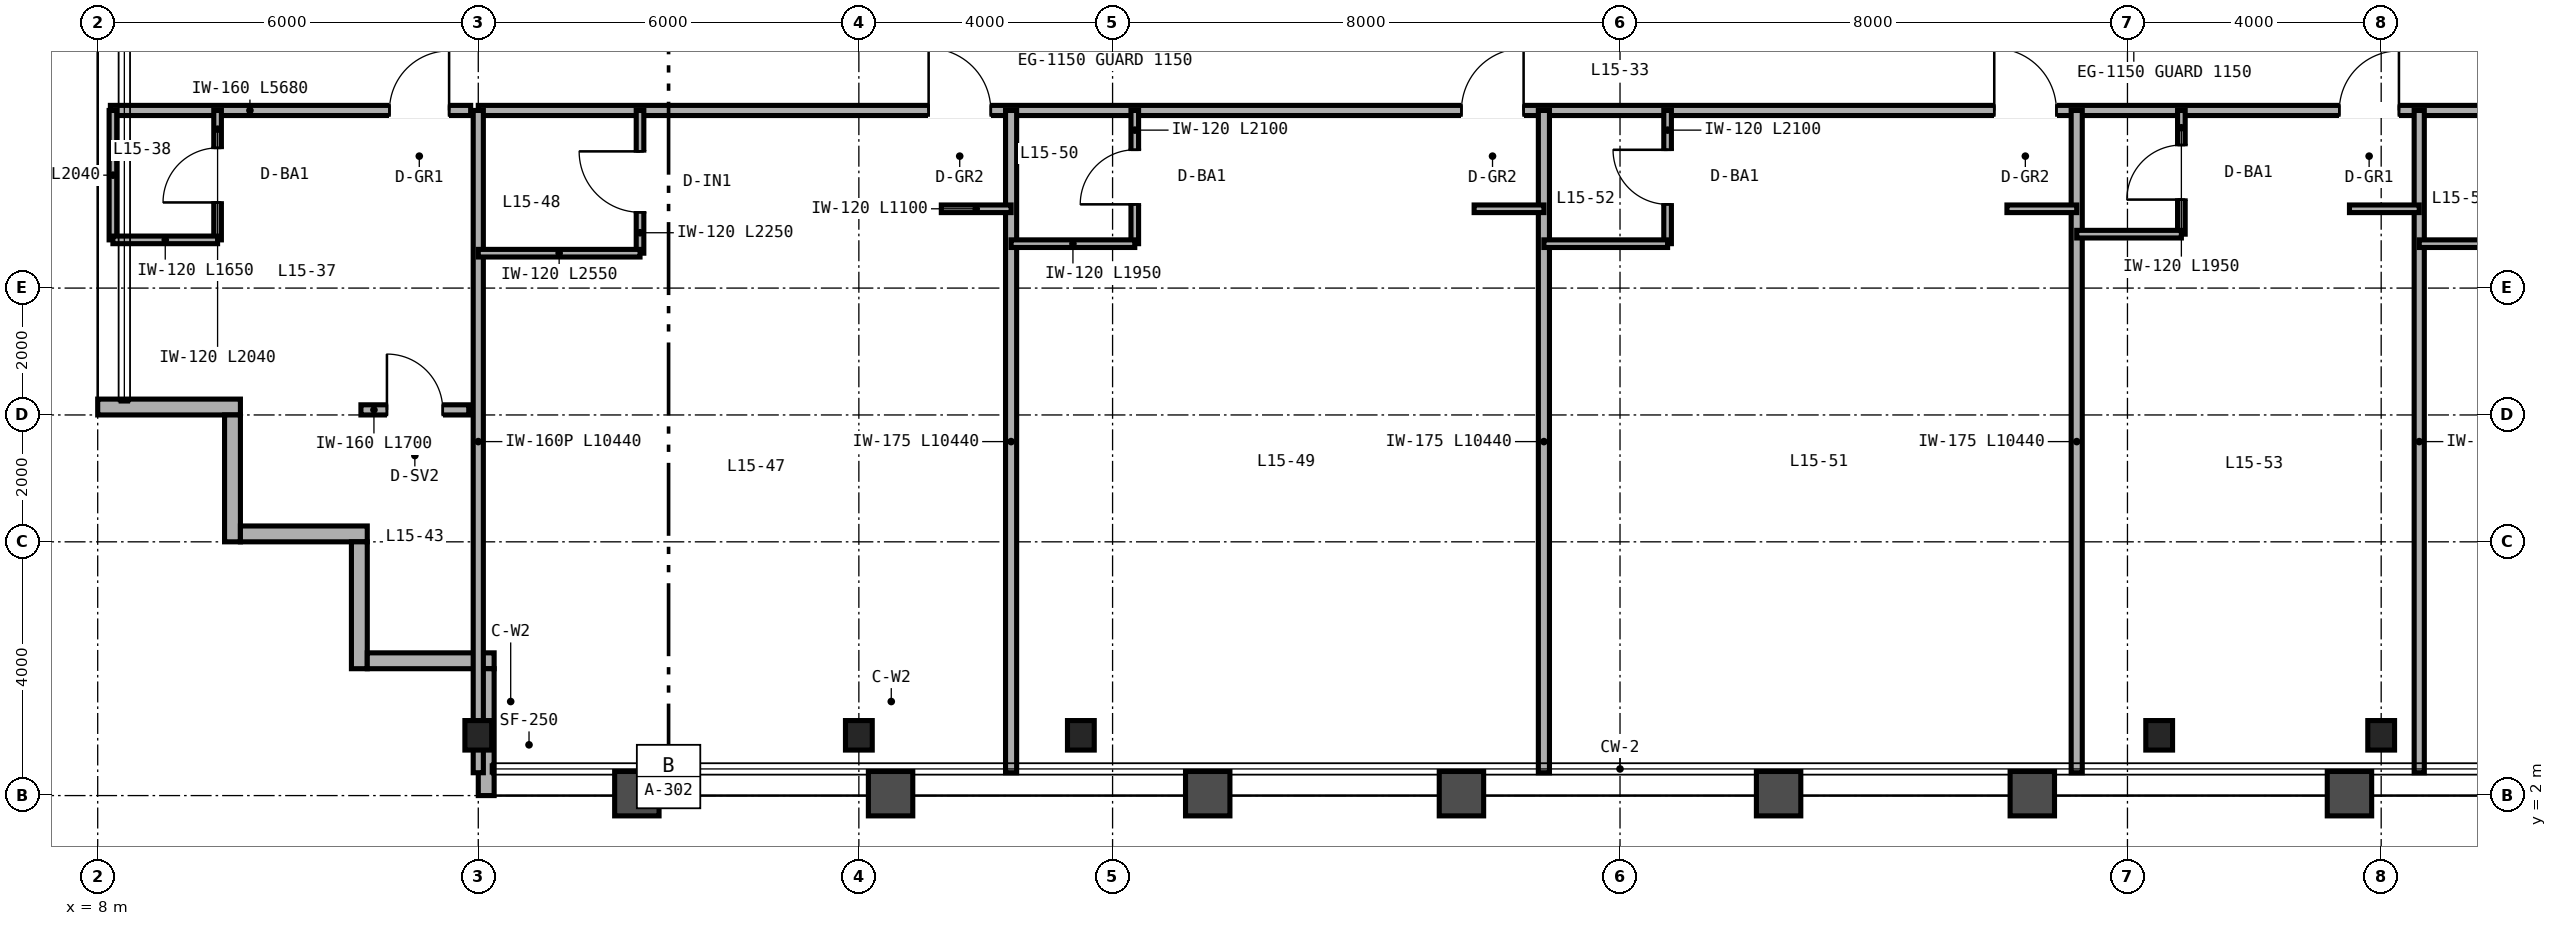
"""IFC4 building model, lengths in metres.
Left out: names, types, materials, properties, quantities, classifications, styles, units other than length and angle.
Written with IfcOpenShell. Run it as: python <this file> out.ifc"""

import sys

from ifc_helpers import new_model, si_unit, direction, frame, frame_2d, origin, origin_2d, place, context, subcontext, project, spatial, rectangle, i_section, extrude, source, transform, mapped, element, fill, save


model = new_model("IFC4")
c1 = context("Model", 3, precision=1e-05, world=origin(), true_north=direction((0.0, 1.0)))
c2 = subcontext(c1, "Body", "Model", "MODEL_VIEW")
j1 = project(units=[si_unit("LENGTHUNIT", "METRE"), si_unit("PLANEANGLEUNIT", "RADIAN")], contexts=[c1])
p1 = place(None, origin())
s1 = spatial("IfcSite", under=j1, at=p1, CompositionType="ELEMENT")
p2 = place(p1, origin())
s2 = spatial("IfcBuilding", under=s1, at=p2, CompositionType="ELEMENT")
p3 = place(p2, frame((0.0, 0.0, 63.6)))
s3 = spatial("IfcBuildingStorey", under=s2, at=p3, CompositionType="ELEMENT", Elevation=63.6)
m1 = source(origin(), c2, "Body", "SweptSolid", [
    extrude(i_section(OverallWidth=0.422, OverallDepth=0.465, WebThickness=0.045, FlangeThickness=0.073, FilletRadius=0.025, at=origin_2d()), origin(), (0.0, 0.0, 1.0), 3.35),
])
for number, where, z_axis, x_axis in (
    (1, (14.0, 2.95, 0.0), (0.0, 0.0, 1.0), (1.0, 0.0, 0.0)),
    (2, (20.0, 2.95, 0.0), (0.0, 0.0, 1.0), (1.0, 0.0, 0.0)),
    (3, (23.5, 2.95, 0.0), (0.0, 0.0, 1.0), (1.0, 0.0, 0.0)),
    (4, (40.5, 2.95, 0.0), (0.0, 0.0, 1.0), (1.0, 0.0, 0.0)),
    (5, (44.0, 2.95, 0.0), (0.0, 0.0, 1.0), (1.0, 0.0, 0.0)),
):
    element("IfcColumn", number, at=place(p3, frame(where, z_axis=z_axis, x_axis=x_axis)), inside=s3, PredefinedType="COLUMN", context=c2, shape_type="MappedRepresentation", body=[
        mapped(m1, transform((0.0, 0.0, 0.0), scale=1.0)),
    ])
p4 = place(p3, frame((8.0, 8.125, 0.0), z_axis=(0.0, 0.0, 1.0), x_axis=(1.0, 0.0, 0.0)))
e6 = element("IfcWall", 6, at=p4, inside=s3, PredefinedType="SOLIDWALL", context=c2, shape_type="SweptSolid", body=[
    extrude(rectangle(XDim=2.25, YDim=0.25, at=frame_2d((1.125, 0.0))), origin(), (0.0, 0.0, 1.0), 3.35),
])
for number, where, z_axis, x_axis in (
    (7, (10.125, 8.0, 0.0), (0.0, 0.0, 1.0), (0.0, -1.0, 0.0)),
    (8, (10.25, 6.125, 0.0), (0.0, 0.0, 1.0), (1.0, 0.0, 0.0)),
    (9, (12.125, 6.0, 0.0), (0.0, 0.0, 1.0), (0.0, -1.0, 0.0)),
    (10, (12.25, 4.125, 0.0), (0.0, 0.0, 1.0), (1.0, 0.0, 0.0)),
):
    element("IfcWall", number, at=place(p3, frame(where, z_axis=z_axis, x_axis=x_axis)), inside=s3, PredefinedType="SOLIDWALL", context=c2, shape_type="SweptSolid", body=[
        extrude(rectangle(XDim=2.0, YDim=0.25, at=frame_2d((1.0, 0.0))), origin(), (0.0, 0.0, 1.0), 3.35),
    ])
p5 = place(p3, frame((14.125, 4.0, 0.0), z_axis=(0.0, 0.0, 1.0), x_axis=(0.0, -1.0, 0.0)))
e11 = element("IfcWall", 11, at=p5, inside=s3, PredefinedType="SOLIDWALL", context=c2, shape_type="SweptSolid", body=[
    extrude(rectangle(XDim=2.0, YDim=0.25, at=frame_2d((1.0, 0.0))), origin(), (0.0, 0.0, 1.0), 2.657),
])
p6 = place(p3, frame((8.2, 12.8, 0.0), z_axis=(0.0, 0.0, 1.0), x_axis=(1.0, 0.0, 0.0)))
e12 = element("IfcWall", 12, at=p6, inside=s3, PredefinedType="PARTITIONING", context=c2, shape_type="SweptSolid", body=[
    extrude(rectangle(XDim=5.68, YDim=0.16, at=frame_2d((2.84, 0.0))), origin(), (0.0, 0.0, 1.0), 3.35),
])
p7 = place(p6, frame((4.4, 0.0, 0.0)))
e13 = element("IfcOpeningElement", 13, at=p7, cuts=e12, PredefinedType="OPENING", context=c2, shape_type="SweptSolid", body=[
    extrude(rectangle(XDim=0.94, YDim=2.15, at=frame_2d((0.47, 1.075))), frame((0.0, 0.09, 0.0), z_axis=(0.0, -1.0, 0.0), x_axis=(1.0, 0.0, 0.0)), (0.0, 0.0, 1.0), 0.18),
])
p8 = place(p3, frame((9.89, 10.76, 0.0), z_axis=(0.0, 0.0, 1.0), x_axis=(0.0, 1.0, 0.0)))
e14 = element("IfcWall", 14, at=p8, inside=s3, PredefinedType="PARTITIONING", context=c2, shape_type="SweptSolid", body=[
    extrude(rectangle(XDim=2.04, YDim=0.12, at=frame_2d((1.02, 0.0))), origin(), (0.0, 0.0, 1.0), 3.35),
])
p9 = place(p8, frame((0.59, 0.0, 0.0)))
e15 = element("IfcOpeningElement", 15, at=p9, cuts=e14, PredefinedType="OPENING", context=c2, shape_type="SweptSolid", body=[
    extrude(rectangle(XDim=0.86, YDim=2.1, at=frame_2d((0.43, 1.05))), frame((0.0, 0.07, 0.0), z_axis=(0.0, -1.0, 0.0), x_axis=(1.0, 0.0, 0.0)), (0.0, 0.0, 1.0), 0.14),
])
p10 = place(p3, frame((8.24, 10.76, 0.0), z_axis=(0.0, 0.0, 1.0), x_axis=(0.0, 1.0, 0.0)))
e16 = element("IfcWall", 16, at=p10, inside=s3, PredefinedType="PARTITIONING", context=c2, shape_type="SweptSolid", body=[
    extrude(rectangle(XDim=2.04, YDim=0.12, at=frame_2d((1.02, 0.0))), origin(), (0.0, 0.0, 1.0), 3.35),
])
p11 = place(p3, frame((8.24, 10.76, 0.0), z_axis=(0.0, 0.0, 1.0), x_axis=(1.0, 0.0, 0.0)))
e17 = element("IfcWall", 17, at=p11, inside=s3, PredefinedType="PARTITIONING", context=c2, shape_type="SweptSolid", body=[
    extrude(rectangle(XDim=1.65, YDim=0.12, at=frame_2d((0.825, 0.0))), origin(), (0.0, 0.0, 1.0), 3.35),
])
p12 = place(p3, frame((12.15, 8.08, 0.0), z_axis=(0.0, 0.0, 1.0), x_axis=(1.0, 0.0, 0.0)))
e18 = element("IfcWall", 18, at=p12, inside=s3, PredefinedType="PARTITIONING", context=c2, shape_type="SweptSolid", body=[
    extrude(rectangle(XDim=1.7, YDim=0.16, at=frame_2d((0.85, 0.0))), origin(), (0.0, 0.0, 1.0), 3.35),
])
p13 = place(p12, frame((0.41, 0.0, 0.0)))
e19 = element("IfcOpeningElement", 19, at=p13, cuts=e18, PredefinedType="OPENING", context=c2, shape_type="SweptSolid", body=[
    extrude(rectangle(XDim=0.88, YDim=2.15, at=frame_2d((0.44, 1.075))), frame((0.0, 0.09, 0.0), z_axis=(0.0, -1.0, 0.0), x_axis=(1.0, 0.0, 0.0)), (0.0, 0.0, 1.0), 0.18),
])
p14 = place(p3, frame((14.0, 12.8, 0.0), z_axis=(0.0, 0.0, 1.0), x_axis=(1.0, 0.0, 0.0)))
e20 = element("IfcWall", 20, at=p14, inside=s3, PredefinedType="PARTITIONING", context=c2, shape_type="SweptSolid", body=[
    extrude(rectangle(XDim=36.0, YDim=0.16, at=frame_2d((18.0, 0.0))), origin(), (0.0, 0.0, 1.0), 2.571),
])
p15 = place(p14, frame((7.1, 0.0, 0.0)))
e21 = element("IfcOpeningElement", 21, at=p15, cuts=e20, PredefinedType="OPENING", context=c2, shape_type="SweptSolid", body=[
    extrude(rectangle(XDim=0.98, YDim=2.2, at=frame_2d((0.49, 1.1))), frame((0.0, 0.09, 0.0), z_axis=(0.0, -1.0, 0.0), x_axis=(1.0, 0.0, 0.0)), (0.0, 0.0, 1.0), 0.18),
])
p16 = place(p14, frame((15.5, 0.0, 0.0)))
e22 = element("IfcOpeningElement", 22, at=p16, cuts=e20, PredefinedType="OPENING", context=c2, shape_type="SweptSolid", body=[
    extrude(rectangle(XDim=0.98, YDim=2.2, at=frame_2d((0.49, 1.1))), frame((0.0, 0.09, 0.0), z_axis=(0.0, -1.0, 0.0), x_axis=(1.0, 0.0, 0.0)), (0.0, 0.0, 1.0), 0.18),
])
p17 = place(p14, frame((23.9, 0.0, 0.0)))
e23 = element("IfcOpeningElement", 23, at=p17, cuts=e20, PredefinedType="OPENING", context=c2, shape_type="SweptSolid", body=[
    extrude(rectangle(XDim=0.98, YDim=2.2, at=frame_2d((0.49, 1.1))), frame((0.0, 0.09, 0.0), z_axis=(0.0, -1.0, 0.0), x_axis=(1.0, 0.0, 0.0)), (0.0, 0.0, 1.0), 0.18),
])
p18 = place(p14, frame((29.34, 0.0, 0.0)))
e24 = element("IfcOpeningElement", 24, at=p18, cuts=e20, PredefinedType="OPENING", context=c2, shape_type="SweptSolid", body=[
    extrude(rectangle(XDim=0.94, YDim=2.15, at=frame_2d((0.47, 1.075))), frame((0.0, 0.09, 0.0), z_axis=(0.0, -1.0, 0.0), x_axis=(1.0, 0.0, 0.0)), (0.0, 0.0, 1.0), 0.18),
])
p19 = place(p14, frame((34.74, 0.0, 0.0)))
e25 = element("IfcOpeningElement", 25, at=p19, cuts=e20, PredefinedType="OPENING", context=c2, shape_type="SweptSolid", body=[
    extrude(rectangle(XDim=0.94, YDim=2.15, at=frame_2d((0.47, 1.075))), frame((0.0, 0.09, 0.0), z_axis=(0.0, -1.0, 0.0), x_axis=(1.0, 0.0, 0.0)), (0.0, 0.0, 1.0), 0.18),
])
p20 = place(p3, frame((14.0, 2.36, 0.0), z_axis=(0.0, 0.0, 1.0), x_axis=(0.0, 1.0, 0.0)))
e26 = element("IfcWall", 26, at=p20, inside=s3, PredefinedType="PARTITIONING", context=c2, shape_type="SweptSolid", body=[
    extrude(rectangle(XDim=10.44, YDim=0.16, at=frame_2d((5.22, 0.0))), origin(), (0.0, 0.0, 1.0), 2.657),
])
p21 = place(p3, frame((22.4, 2.36, 0.0), z_axis=(0.0, 0.0, 1.0), x_axis=(0.0, 1.0, 0.0)))
e27 = element("IfcWall", 27, at=p21, inside=s3, PredefinedType="PARTITIONING", context=c2, shape_type="SweptSolid", body=[
    extrude(rectangle(XDim=10.44, YDim=0.175, at=frame_2d((5.22, 0.0))), origin(), (0.0, 0.0, 1.0), 2.813),
])
p22 = place(p3, frame((16.55, 10.55, 0.0), z_axis=(0.0, 0.0, 1.0), x_axis=(0.0, 1.0, 0.0)))
e28 = element("IfcWall", 28, at=p22, inside=s3, PredefinedType="PARTITIONING", context=c2, shape_type="SweptSolid", body=[
    extrude(rectangle(XDim=2.25, YDim=0.12, at=frame_2d((1.125, 0.0))), origin(), (0.0, 0.0, 1.0), 3.35),
])
p23 = place(p22, frame((0.645, 0.0, 0.0)))
e29 = element("IfcOpeningElement", 29, at=p23, cuts=e28, PredefinedType="OPENING", context=c2, shape_type="SweptSolid", body=[
    extrude(rectangle(XDim=0.96, YDim=2.15, at=frame_2d((0.48, 1.075))), frame((0.0, 0.07, 0.0), z_axis=(0.0, -1.0, 0.0), x_axis=(1.0, 0.0, 0.0)), (0.0, 0.0, 1.0), 0.14),
])
p24 = place(p3, frame((14.0, 10.55, 0.0), z_axis=(0.0, 0.0, 1.0), x_axis=(1.0, 0.0, 0.0)))
e30 = element("IfcWall", 30, at=p24, inside=s3, PredefinedType="PARTITIONING", context=c2, shape_type="SweptSolid", body=[
    extrude(rectangle(XDim=2.55, YDim=0.12, at=frame_2d((1.275, 0.0))), origin(), (0.0, 0.0, 1.0), 3.35),
])
p25 = place(p3, frame((21.3, 11.25, 0.0), z_axis=(0.0, 0.0, 1.0), x_axis=(1.0, 0.0, 0.0)))
e31 = element("IfcWall", 31, at=p25, inside=s3, PredefinedType="PARTITIONING", context=c2, shape_type="SweptSolid", body=[
    extrude(rectangle(XDim=1.1, YDim=0.12, at=frame_2d((0.55, 0.0))), origin(), (0.0, 0.0, 1.0), 3.35),
])
p26 = place(p3, frame((30.8, 2.36, 0.0), z_axis=(0.0, 0.0, 1.0), x_axis=(0.0, 1.0, 0.0)))
e32 = element("IfcWall", 32, at=p26, inside=s3, PredefinedType="PARTITIONING", context=c2, shape_type="SweptSolid", body=[
    extrude(rectangle(XDim=10.44, YDim=0.175, at=frame_2d((5.22, 0.0))), origin(), (0.0, 0.0, 1.0), 2.423),
])
p27 = place(p3, frame((24.35, 10.7, 0.0), z_axis=(0.0, 0.0, 1.0), x_axis=(0.0, 1.0, 0.0)))
e33 = element("IfcWall", 33, at=p27, inside=s3, PredefinedType="PARTITIONING", context=c2, shape_type="SweptSolid", body=[
    extrude(rectangle(XDim=2.1, YDim=0.12, at=frame_2d((1.05, 0.0))), origin(), (0.0, 0.0, 1.0), 3.35),
])
p28 = place(p27, frame((0.62, 0.0, 0.0)))
e34 = element("IfcOpeningElement", 34, at=p28, cuts=e33, PredefinedType="OPENING", context=c2, shape_type="SweptSolid", body=[
    extrude(rectangle(XDim=0.86, YDim=2.1, at=frame_2d((0.43, 1.05))), frame((0.0, 0.07, 0.0), z_axis=(0.0, -1.0, 0.0), x_axis=(1.0, 0.0, 0.0)), (0.0, 0.0, 1.0), 0.14),
])
p29 = place(p3, frame((22.4, 10.7, 0.0), z_axis=(0.0, 0.0, 1.0), x_axis=(1.0, 0.0, 0.0)))
e35 = element("IfcWall", 35, at=p29, inside=s3, PredefinedType="PARTITIONING", context=c2, shape_type="SweptSolid", body=[
    extrude(rectangle(XDim=1.95, YDim=0.12, at=frame_2d((0.975, 0.0))), origin(), (0.0, 0.0, 1.0), 2.571),
])
p30 = place(p3, frame((29.7, 11.25, 0.0), z_axis=(0.0, 0.0, 1.0), x_axis=(1.0, 0.0, 0.0)))
e36 = element("IfcWall", 36, at=p30, inside=s3, PredefinedType="PARTITIONING", context=c2, shape_type="SweptSolid", body=[
    extrude(rectangle(XDim=1.1, YDim=0.12, at=frame_2d((0.55, 0.0))), origin(), (0.0, 0.0, 1.0), 3.35),
])
p31 = place(p3, frame((39.2, 2.36, 0.0), z_axis=(0.0, 0.0, 1.0), x_axis=(0.0, 1.0, 0.0)))
e37 = element("IfcWall", 37, at=p31, inside=s3, PredefinedType="PARTITIONING", context=c2, shape_type="SweptSolid", body=[
    extrude(rectangle(XDim=10.44, YDim=0.175, at=frame_2d((5.22, 0.0))), origin(), (0.0, 0.0, 1.0), 2.423),
])
p32 = place(p3, frame((32.75, 10.7, 0.0), z_axis=(0.0, 0.0, 1.0), x_axis=(0.0, 1.0, 0.0)))
e38 = element("IfcWall", 38, at=p32, inside=s3, PredefinedType="PARTITIONING", context=c2, shape_type="SweptSolid", body=[
    extrude(rectangle(XDim=2.1, YDim=0.12, at=frame_2d((1.05, 0.0))), origin(), (0.0, 0.0, 1.0), 3.35),
])
p33 = place(p32, frame((0.62, 0.0, 0.0)))
e39 = element("IfcOpeningElement", 39, at=p33, cuts=e38, PredefinedType="OPENING", context=c2, shape_type="SweptSolid", body=[
    extrude(rectangle(XDim=0.86, YDim=2.1, at=frame_2d((0.43, 1.05))), frame((0.0, 0.07, 0.0), z_axis=(0.0, -1.0, 0.0), x_axis=(1.0, 0.0, 0.0)), (0.0, 0.0, 1.0), 0.14),
])
p34 = place(p3, frame((30.8, 10.7, 0.0), z_axis=(0.0, 0.0, 1.0), x_axis=(1.0, 0.0, 0.0)))
e40 = element("IfcWall", 40, at=p34, inside=s3, PredefinedType="PARTITIONING", context=c2, shape_type="SweptSolid", body=[
    extrude(rectangle(XDim=1.95, YDim=0.12, at=frame_2d((0.975, 0.0))), origin(), (0.0, 0.0, 1.0), 3.35),
])
p35 = place(p3, frame((38.1, 11.25, 0.0), z_axis=(0.0, 0.0, 1.0), x_axis=(1.0, 0.0, 0.0)))
e41 = element("IfcWall", 41, at=p35, inside=s3, PredefinedType="PARTITIONING", context=c2, shape_type="SweptSolid", body=[
    extrude(rectangle(XDim=1.1, YDim=0.12, at=frame_2d((0.55, 0.0))), origin(), (0.0, 0.0, 1.0), 3.35),
])
p36 = place(p3, frame((44.6, 2.36, 0.0), z_axis=(0.0, 0.0, 1.0), x_axis=(0.0, 1.0, 0.0)))
e42 = element("IfcWall", 42, at=p36, inside=s3, PredefinedType="PARTITIONING", context=c2, shape_type="SweptSolid", body=[
    extrude(rectangle(XDim=10.44, YDim=0.16, at=frame_2d((5.22, 0.0))), origin(), (0.0, 0.0, 1.0), 2.657),
])
p37 = place(p3, frame((40.85, 10.85, 0.0), z_axis=(0.0, 0.0, 1.0), x_axis=(0.0, 1.0, 0.0)))
e43 = element("IfcWall", 43, at=p37, inside=s3, PredefinedType="PARTITIONING", context=c2, shape_type="SweptSolid", body=[
    extrude(rectangle(XDim=1.95, YDim=0.12, at=frame_2d((0.975, 0.0))), origin(), (0.0, 0.0, 1.0), 3.35),
])
p38 = place(p37, frame((0.545, 0.0, 0.0)))
e44 = element("IfcOpeningElement", 44, at=p38, cuts=e43, PredefinedType="OPENING", context=c2, shape_type="SweptSolid", body=[
    extrude(rectangle(XDim=0.86, YDim=2.1, at=frame_2d((0.43, 1.05))), frame((0.0, 0.07, 0.0), z_axis=(0.0, -1.0, 0.0), x_axis=(1.0, 0.0, 0.0)), (0.0, 0.0, 1.0), 0.14),
])
p39 = place(p3, frame((39.2, 10.85, 0.0), z_axis=(0.0, 0.0, 1.0), x_axis=(1.0, 0.0, 0.0)))
e45 = element("IfcWall", 45, at=p39, inside=s3, PredefinedType="PARTITIONING", context=c2, shape_type="SweptSolid", body=[
    extrude(rectangle(XDim=1.65, YDim=0.12, at=frame_2d((0.825, 0.0))), origin(), (0.0, 0.0, 1.0), 2.571),
])
p40 = place(p3, frame((43.5, 11.25, 0.0), z_axis=(0.0, 0.0, 1.0), x_axis=(1.0, 0.0, 0.0)))
e46 = element("IfcWall", 46, at=p40, inside=s3, PredefinedType="PARTITIONING", context=c2, shape_type="SweptSolid", body=[
    extrude(rectangle(XDim=1.1, YDim=0.12, at=frame_2d((0.55, 0.0))), origin(), (0.0, 0.0, 1.0), 3.35),
])
p41 = place(p3, frame((44.6, 10.7, 0.0), z_axis=(0.0, 0.0, 1.0), x_axis=(1.0, 0.0, 0.0)))
e47 = element("IfcWall", 47, at=p41, inside=s3, PredefinedType="PARTITIONING", context=c2, shape_type="SweptSolid", body=[
    extrude(rectangle(XDim=1.95, YDim=0.12, at=frame_2d((0.975, 0.0))), origin(), (0.0, 0.0, 1.0), 3.35),
])
m2 = source(origin(), c2, "Body", "SweptSolid", [
    extrude(rectangle(XDim=0.86, YDim=2.1, at=frame_2d((0.43, 1.05))), frame((0.0, 0.025, 0.0), z_axis=(0.0, -1.0, 0.0), x_axis=(1.0, 0.0, 0.0)), (0.0, 0.0, 1.0), 0.05),
])
p42 = place(p9, origin())
e48 = element("IfcDoor", 48, at=p42, inside=s3, OperationType="SINGLE_SWING_LEFT", PredefinedType="DOOR", context=c2, shape_type="MappedRepresentation", body=[
    mapped(m2, transform((0.0, 0.0, 0.0), scale=1.0)),
])
fill(e15, e48)
m3 = source(origin(), c2, "Body", "SweptSolid", [
    extrude(rectangle(XDim=0.94, YDim=2.15, at=frame_2d((0.47, 1.075))), frame((0.0, 0.025, 0.0), z_axis=(0.0, -1.0, 0.0), x_axis=(1.0, 0.0, 0.0)), (0.0, 0.0, 1.0), 0.05),
])
p43 = place(p7, origin())
e49 = element("IfcDoor", 49, at=p43, inside=s3, OperationType="SINGLE_SWING_RIGHT", PredefinedType="DOOR", context=c2, shape_type="MappedRepresentation", body=[
    mapped(m3, transform((0.0, 0.0, 0.0), scale=1.0)),
])
fill(e13, e49)
m4 = source(origin(), c2, "Body", "SweptSolid", [
    extrude(rectangle(XDim=0.88, YDim=2.15, at=frame_2d((0.44, 1.075))), frame((0.0, 0.025, 0.0), z_axis=(0.0, -1.0, 0.0), x_axis=(1.0, 0.0, 0.0)), (0.0, 0.0, 1.0), 0.05),
])
p44 = place(p13, origin())
e50 = element("IfcDoor", 50, at=p44, inside=s3, OperationType="SINGLE_SWING_LEFT", PredefinedType="DOOR", context=c2, shape_type="MappedRepresentation", body=[
    mapped(m4, transform((0.0, 0.0, 0.0), scale=1.0)),
])
fill(e19, e50)
m5 = source(origin(), c2, "Body", "SweptSolid", [
    extrude(rectangle(XDim=0.96, YDim=2.15, at=frame_2d((0.48, 1.075))), frame((0.0, 0.025, 0.0), z_axis=(0.0, -1.0, 0.0), x_axis=(1.0, 0.0, 0.0)), (0.0, 0.0, 1.0), 0.05),
])
p45 = place(p23, origin())
e51 = element("IfcDoor", 51, at=p45, inside=s3, OperationType="SINGLE_SWING_RIGHT", PredefinedType="DOOR", context=c2, shape_type="MappedRepresentation", body=[
    mapped(m5, transform((0.0, 0.0, 0.0), scale=1.0)),
])
fill(e29, e51)
p46 = place(p28, origin())
e52 = element("IfcDoor", 52, at=p46, inside=s3, OperationType="SINGLE_SWING_LEFT", PredefinedType="DOOR", context=c2, shape_type="MappedRepresentation", body=[
    mapped(m2, transform((0.0, 0.0, 0.0), scale=1.0)),
])
fill(e34, e52)
p47 = place(p33, origin())
e53 = element("IfcDoor", 53, at=p47, inside=s3, OperationType="SINGLE_SWING_RIGHT", PredefinedType="DOOR", context=c2, shape_type="MappedRepresentation", body=[
    mapped(m2, transform((0.0, 0.0, 0.0), scale=1.0)),
])
fill(e39, e53)
p48 = place(p38, origin())
e54 = element("IfcDoor", 54, at=p48, inside=s3, OperationType="SINGLE_SWING_LEFT", PredefinedType="DOOR", context=c2, shape_type="MappedRepresentation", body=[
    mapped(m2, transform((0.0, 0.0, 0.0), scale=1.0)),
])
fill(e44, e54)
m6 = source(origin(), c2, "Body", "SweptSolid", [
    extrude(rectangle(XDim=0.98, YDim=2.2, at=frame_2d((0.49, 1.1))), frame((0.0, 0.025, 0.0), z_axis=(0.0, -1.0, 0.0), x_axis=(1.0, 0.0, 0.0)), (0.0, 0.0, 1.0), 0.05),
])
p49 = place(p15, origin())
e55 = element("IfcDoor", 55, at=p49, inside=s3, OperationType="SINGLE_SWING_LEFT", PredefinedType="DOOR", context=c2, shape_type="MappedRepresentation", body=[
    mapped(m6, transform((0.0, 0.0, 0.0), scale=1.0)),
])
fill(e21, e55)
p50 = place(p16, origin())
e56 = element("IfcDoor", 56, at=p50, inside=s3, OperationType="SINGLE_SWING_RIGHT", PredefinedType="DOOR", context=c2, shape_type="MappedRepresentation", body=[
    mapped(m6, transform((0.0, 0.0, 0.0), scale=1.0)),
])
fill(e22, e56)
p51 = place(p17, origin())
e57 = element("IfcDoor", 57, at=p51, inside=s3, OperationType="SINGLE_SWING_LEFT", PredefinedType="DOOR", context=c2, shape_type="MappedRepresentation", body=[
    mapped(m6, transform((0.0, 0.0, 0.0), scale=1.0)),
])
fill(e23, e57)
p52 = place(p18, origin())
e58 = element("IfcDoor", 58, at=p52, inside=s3, OperationType="SINGLE_SWING_RIGHT", PredefinedType="DOOR", context=c2, shape_type="MappedRepresentation", body=[
    mapped(m3, transform((0.0, 0.0, 0.0), scale=1.0)),
])
fill(e24, e58)
save(model, sys.argv[1])
